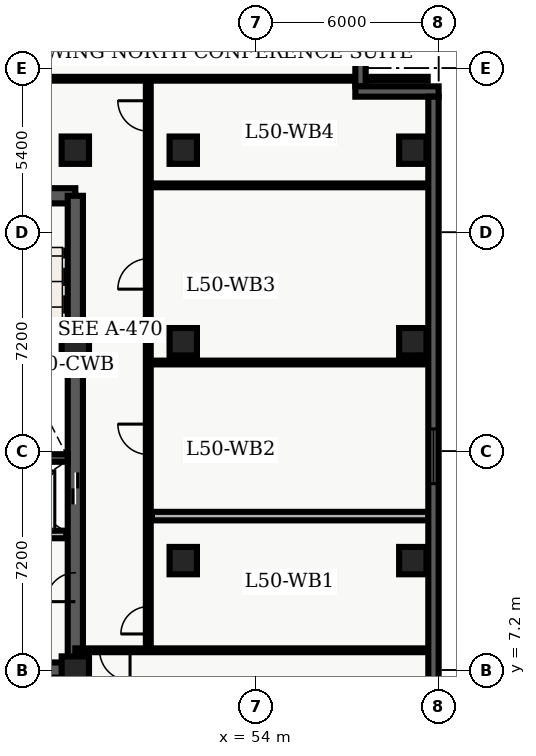
"""IFC4 building model, lengths in metres.
Left out: names, types, materials, properties, quantities, classifications, styles, units other than length and angle.
Written with IfcOpenShell. Run it as: python <this file> out.ifc"""

import sys

from ifc_helpers import new_model, entity, si_unit, converted_unit, direction, frame, origin_with_axes, origin_2d_with_axis, place, context, subcontext, project, spatial, polyline, rectangle, outline, extrude, element, fill, save


model = new_model("IFC4")
c1 = context("Model", 3, precision=1e-05, world=origin_with_axes(), true_north=direction((0.0, 1.0)))
c2 = subcontext(c1, "Body", "Model", "MODEL_VIEW")
j1 = project(units=[si_unit("LENGTHUNIT", "METRE"), converted_unit("PLANEANGLEUNIT", "DEGREE", entity("IfcPlaneAngleMeasure", 0.017), si_unit("PLANEANGLEUNIT", "RADIAN"), dimensions=[0, 0, 0, 0, 0, 0, 0])], contexts=[c1])
p1 = place(None, origin_with_axes())
s1 = spatial("IfcSite", under=j1, at=p1, CompositionType="ELEMENT")
p2 = place(p1, origin_with_axes())
s2 = spatial("IfcBuilding", under=s1, at=p2, CompositionType="ELEMENT")
p3 = place(p2, frame((0.0, 0.0, 204.3), z_axis=(0.0, 0.0, 1.0), x_axis=(1.0, 0.0, 0.0)))
s3 = spatial("IfcBuildingStorey", under=s2, at=p3, CompositionType="ELEMENT", Elevation=204.3)
p4 = place(p3, frame((40.2, 7.2, 0.0), z_axis=(0.0, 0.0, 1.0), x_axis=(1.0, 0.0, 0.0)))
e1 = element("IfcWall", 1, at=p4, inside=s3, PredefinedType="SHEAR", context=c2, shape_type="SweptSolid", body=[
    extrude(outline(polyline([(0.0, -0.25), (7.85, -0.25), (7.85, 0.25), (0.0, 0.25), (0.0, -0.25)])), origin_with_axes(), (0.0, 0.0, 1.0), 3.66),
])
p5 = place(p4, frame((2.175, 0.0, 0.0), z_axis=(0.0, 0.0, 1.0), x_axis=(1.0, 0.0, 0.0)))
e2 = element("IfcOpeningElement", 2, at=p5, cuts=e1, PredefinedType="OPENING", context=c2, shape_type="SweptSolid", body=[
    extrude(rectangle(XDim=1.05, YDim=0.52, at=origin_2d_with_axis()), origin_with_axes(), (0.0, 0.0, 1.0), 2.15),
])
p6 = place(p3, frame((40.2, 22.8, 0.0), z_axis=(0.0, 0.0, 1.0), x_axis=(1.0, 0.0, 0.0)))
e3 = element("IfcWall", 3, at=p6, inside=s3, PredefinedType="SHEAR", context=c2, shape_type="SweptSolid", body=[
    extrude(outline(polyline([(0.0, -0.25), (7.85, -0.25), (7.85, 0.25), (0.0, 0.25), (0.0, -0.25)])), origin_with_axes(), (0.0, 0.0, 1.0), 3.66),
])
p7 = place(p6, frame((5.775, 0.0, 0.0), z_axis=(0.0, 0.0, 1.0), x_axis=(1.0, 0.0, 0.0)))
e4 = element("IfcOpeningElement", 4, at=p7, cuts=e3, PredefinedType="OPENING", context=c2, shape_type="SweptSolid", body=[
    extrude(rectangle(XDim=1.05, YDim=0.52, at=origin_2d_with_axis()), origin_with_axes(), (0.0, 0.0, 1.0), 2.15),
])
p8 = place(p3, frame((48.05, 7.2, 0.0), z_axis=(0.0, 0.0, 1.0), x_axis=(0.0, 1.0, 0.0)))
e5 = element("IfcWall", 5, at=p8, inside=s3, PredefinedType="SHEAR", context=c2, shape_type="SweptSolid", body=[
    extrude(outline(polyline([(0.0, -0.25), (15.6, -0.25), (15.6, 0.25), (0.0, 0.25), (0.0, -0.25)])), origin_with_axes(), (0.0, 0.0, 1.0), 3.66),
])
p9 = place(p8, frame((5.975, 0.0, 0.0), z_axis=(0.0, 0.0, 1.0), x_axis=(1.0, 0.0, 0.0)))
e6 = element("IfcOpeningElement", 6, at=p9, cuts=e5, PredefinedType="OPENING", context=c2, shape_type="SweptSolid", body=[
    extrude(rectangle(XDim=1.05, YDim=0.52, at=origin_2d_with_axis()), origin_with_axes(), (0.0, 0.0, 1.0), 2.15),
])
p10 = place(p8, frame((2.725, 0.0, 0.0), z_axis=(0.0, 0.0, 1.0), x_axis=(1.0, 0.0, 0.0)))
e7 = element("IfcOpeningElement", 7, at=p10, cuts=e5, PredefinedType="OPENING", context=c2, shape_type="SweptSolid", body=[
    extrude(rectangle(XDim=0.95, YDim=0.52, at=origin_2d_with_axis()), origin_with_axes(), (0.0, 0.0, 1.0), 2.15),
])
p11 = place(p3, frame((44.25, 14.175, 0.0), z_axis=(0.0, 0.0, 1.0), x_axis=(1.0, 0.0, 0.0)))
e8 = element("IfcWall", 8, at=p11, inside=s3, PredefinedType="SHEAR", context=c2, shape_type="SweptSolid", body=[
    extrude(outline(polyline([(0.0, -0.125), (3.55, -0.125), (3.55, 0.125), (0.0, 0.125), (0.0, -0.125)])), origin_with_axes(), (0.0, 0.0, 1.0), 3.66),
])
for number, where, z_axis, x_axis in (
    (9, (48.05, 7.2, 0.0), (0.0, 0.0, 1.0), (1.0, 0.0, 0.0)),
    (10, (48.05, 18.0, 0.0), (0.0, 0.0, 1.0), (1.0, 0.0, 0.0)),
    (11, (48.05, 24.3, 0.0), (0.0, 0.0, 1.0), (1.0, 0.0, 0.0)),
    (12, (51.6, 10.8, 0.0), (0.0, 0.0, 1.0), (1.0, 0.0, 0.0)),
    (13, (51.6, 18.0, 0.0), (0.0, 0.0, 1.0), (1.0, 0.0, 0.0)),
    (14, (51.6, 24.3, 0.0), (0.0, 0.0, 1.0), (1.0, 0.0, 0.0)),
    (15, (59.15, 10.8, 0.0), (0.0, 0.0, 1.0), (1.0, 0.0, 0.0)),
    (16, (59.15, 18.0, 0.0), (0.0, 0.0, 1.0), (1.0, 0.0, 0.0)),
    (17, (59.15, 24.3, 0.0), (0.0, 0.0, 1.0), (1.0, 0.0, 0.0)),
):
    element("IfcColumn", number, at=place(p3, frame(where, z_axis=z_axis, x_axis=x_axis)), inside=s3, PredefinedType="COLUMN", context=c2, shape_type="SweptSolid", body=[
        extrude(rectangle(XDim=0.9, YDim=0.9, at=origin_2d_with_axis()), origin_with_axes(), (0.0, 0.0, 1.0), 3.9),
    ])
p12 = place(p3, frame((44.25, 11.66, 0.0), z_axis=(0.0, 0.0, 1.0), x_axis=(1.0, 0.0, 0.0)))
e18 = element("IfcWall", 18, at=p12, inside=s3, PredefinedType="SOLIDWALL", context=c2, shape_type="SweptSolid", body=[
    extrude(outline(polyline([(0.0, -0.125), (3.5, -0.125), (3.5, 0.125), (0.0, 0.125), (0.0, -0.125)])), origin_with_axes(), (0.0, 0.0, 1.0), 2.7),
])
p13 = place(p3, frame((50.45, 7.85, 0.0), z_axis=(0.0, 0.0, 1.0), x_axis=(0.0, 1.0, 0.0)))
e19 = element("IfcWall", 19, at=p13, inside=s3, PredefinedType="PARTITIONING", context=c2, shape_type="SweptSolid", body=[
    extrude(outline(polyline([(0.0, -0.08), (18.8, -0.08), (18.8, 0.08), (0.0, 0.08), (0.0, -0.08)])), origin_with_axes(), (0.0, 0.0, 1.0), 2.7),
])
p14 = place(p13, frame((0.987, 0.0, 0.0), z_axis=(0.0, 0.0, 1.0), x_axis=(1.0, 0.0, 0.0)))
e20 = element("IfcOpeningElement", 20, at=p14, cuts=e19, PredefinedType="OPENING", context=c2, shape_type="SweptSolid", body=[
    extrude(rectangle(XDim=0.9, YDim=0.18, at=origin_2d_with_axis()), origin_with_axes(), (0.0, 0.0, 1.0), 2.15),
])
p15 = place(p13, frame((6.94, 0.0, 0.0), z_axis=(0.0, 0.0, 1.0), x_axis=(1.0, 0.0, 0.0)))
e21 = element("IfcOpeningElement", 21, at=p15, cuts=e19, PredefinedType="OPENING", context=c2, shape_type="SweptSolid", body=[
    extrude(rectangle(XDim=1.0, YDim=0.18, at=origin_2d_with_axis()), origin_with_axes(), (0.0, 0.0, 1.0), 2.15),
])
p16 = place(p13, frame((12.38, 0.0, 0.0), z_axis=(0.0, 0.0, 1.0), x_axis=(1.0, 0.0, 0.0)))
e22 = element("IfcOpeningElement", 22, at=p16, cuts=e19, PredefinedType="OPENING", context=c2, shape_type="SweptSolid", body=[
    extrude(rectangle(XDim=1.0, YDim=0.18, at=origin_2d_with_axis()), origin_with_axes(), (0.0, 0.0, 1.0), 2.15),
])
p17 = place(p13, frame((17.576, 0.0, 0.0), z_axis=(0.0, 0.0, 1.0), x_axis=(1.0, 0.0, 0.0)))
e23 = element("IfcOpeningElement", 23, at=p17, cuts=e19, PredefinedType="OPENING", context=c2, shape_type="SweptSolid", body=[
    extrude(rectangle(XDim=1.0, YDim=0.18, at=origin_2d_with_axis()), origin_with_axes(), (0.0, 0.0, 1.0), 2.15),
])
p18 = place(p3, frame((59.665, 7.85, 0.0), z_axis=(0.0, 0.0, 1.0), x_axis=(-1.0, 0.0, 0.0)))
e24 = element("IfcWall", 24, at=p18, inside=s3, PredefinedType="PARTITIONING", context=c2, shape_type="SweptSolid", body=[
    extrude(outline(polyline([(0.0, -0.062), (11.615, -0.062), (11.615, 0.062), (0.0, 0.062), (0.0, -0.062)])), origin_with_axes(), (0.0, 0.0, 1.0), 2.7),
])
p19 = place(p18, frame((10.315, 0.0, 0.0), z_axis=(0.0, 0.0, 1.0), x_axis=(1.0, 0.0, 0.0)))
e25 = element("IfcOpeningElement", 25, at=p19, cuts=e24, PredefinedType="OPENING", context=c2, shape_type="SweptSolid", body=[
    extrude(rectangle(XDim=1.0, YDim=0.145, at=origin_2d_with_axis()), origin_with_axes(), (0.0, 0.0, 1.0), 2.15),
])
p20 = place(p3, frame((38.735, 26.65, 0.0), z_axis=(0.0, 0.0, 1.0), x_axis=(1.0, 0.0, 0.0)))
e26 = element("IfcWall", 26, at=p20, inside=s3, PredefinedType="PARTITIONING", context=c2, shape_type="SweptSolid", body=[
    extrude(outline(polyline([(0.0, -0.062), (20.905, -0.062), (20.905, 0.062), (0.0, 0.062), (0.0, -0.062)])), origin_with_axes(), (0.0, 0.0, 1.0), 2.7),
])
p21 = place(p20, frame((4.265, 0.0, 0.0), z_axis=(0.0, 0.0, 1.0), x_axis=(1.0, 0.0, 0.0)))
e27 = element("IfcOpeningElement", 27, at=p21, cuts=e26, PredefinedType="OPENING", context=c2, shape_type="SweptSolid", body=[
    extrude(rectangle(XDim=1.0, YDim=0.145, at=origin_2d_with_axis()), origin_with_axes(), (0.0, 0.0, 1.0), 2.15),
])
p22 = place(p3, frame((50.57, 12.264, 0.0), z_axis=(0.0, 0.0, 1.0), x_axis=(1.0, 0.0, 0.0)))
e28 = element("IfcWall", 28, at=p22, inside=s3, PredefinedType="PARTITIONING", context=c2, shape_type="SweptSolid", body=[
    extrude(outline(polyline([(0.0, -0.14), (9.095, -0.14), (9.095, 0.14), (0.0, 0.14), (0.0, -0.14)])), origin_with_axes(), (0.0, 0.0, 1.0), 2.7),
])
for number, where, z_axis, x_axis in (
    (29, (50.57, 17.316, 0.0), (0.0, 0.0, 1.0), (1.0, 0.0, 0.0)),
    (30, (50.57, 23.143, 0.0), (0.0, 0.0, 1.0), (1.0, 0.0, 0.0)),
):
    element("IfcWall", number, at=place(p3, frame(where, z_axis=z_axis, x_axis=x_axis)), inside=s3, PredefinedType="PARTITIONING", context=c2, shape_type="SweptSolid", body=[
        extrude(outline(polyline([(0.0, -0.062), (9.095, -0.062), (9.095, 0.062), (0.0, 0.062), (0.0, -0.062)])), origin_with_axes(), (0.0, 0.0, 1.0), 2.7),
    ])
p23 = place(p3, frame((57.43, 28.46, 0.0), z_axis=(0.0, 0.0, 1.0), x_axis=(0.0, -1.0, 0.0)))
e31 = element("IfcWall", 31, at=p23, inside=s3, PredefinedType="SOLIDWALL", context=c2, shape_type="SweptSolid", body=[
    extrude(outline(polyline([(0.0, -0.17), (2.06, -0.17), (2.06, 0.17), (0.0, 0.17), (0.0, -0.17)])), origin_with_axes(), (0.0, 0.0, 1.0), 3.66),
])
p24 = place(p3, frame((57.26, 26.23, 0.0), z_axis=(0.0, 0.0, 1.0), x_axis=(1.0, 0.0, 0.0)))
e32 = element("IfcWall", 32, at=p24, inside=s3, PredefinedType="SOLIDWALL", context=c2, shape_type="SweptSolid", body=[
    extrude(outline(polyline([(0.0, -0.17), (2.74, -0.17), (2.74, 0.17), (0.0, 0.17), (0.0, -0.17)])), origin_with_axes(), (0.0, 0.0, 1.0), 3.66),
])
p25 = place(p3, frame((59.83, 26.06, 0.0), z_axis=(0.0, 0.0, 1.0), x_axis=(0.0, -1.0, 0.0)))
e33 = element("IfcWall", 33, at=p25, inside=s3, PredefinedType="SOLIDWALL", context=c2, shape_type="SweptSolid", body=[
    extrude(outline(polyline([(0.0, -0.17), (23.66, -0.17), (23.66, 0.17), (0.0, 0.17), (0.0, -0.17)])), origin_with_axes(), (0.0, 0.0, 1.0), 3.66),
])
p26 = place(p25, frame((11.83, 0.0, 0.45), z_axis=(0.0, 0.0, 1.0), x_axis=(1.0, 0.0, 0.0)))
e34 = element("IfcOpeningElement", 34, at=p26, cuts=e33, PredefinedType="OPENING", context=c2, shape_type="SweptSolid", body=[
    extrude(rectangle(XDim=1.8, YDim=0.36, at=origin_2d_with_axis()), origin_with_axes(), (0.0, 0.0, 1.0), 2.1),
])
p27 = place(p25, frame((20.364, 0.0, 0.45), z_axis=(0.0, 0.0, 1.0), x_axis=(1.0, 0.0, 0.0)))
e35 = element("IfcOpeningElement", 35, at=p27, cuts=e33, PredefinedType="OPENING", context=c2, shape_type="SweptSolid", body=[
    extrude(rectangle(XDim=1.8, YDim=0.36, at=origin_2d_with_axis()), origin_with_axes(), (0.0, 0.0, 1.0), 2.1),
])
p28 = place(p8, frame((5.975, 0.0, 0.0), z_axis=(0.0, 0.0, 1.0), x_axis=(1.0, 0.0, 0.0)))
e36 = element("IfcDoor", 36, at=p28, inside=s3, OperationType="SLIDING_TO_LEFT", PredefinedType="DOOR", context=c2, shape_type="SweptSolid", body=[
    extrude(rectangle(XDim=1.05, YDim=0.09, at=origin_2d_with_axis()), origin_with_axes(), (0.0, 0.0, 1.0), 2.15),
])
fill(e6, e36)
p29 = place(p8, frame((2.725, 0.0, 0.0), z_axis=(0.0, 0.0, 1.0), x_axis=(1.0, 0.0, 0.0)))
e37 = element("IfcDoor", 37, at=p29, inside=s3, OperationType="SINGLE_SWING_LEFT", PredefinedType="DOOR", context=c2, shape_type="SweptSolid", body=[
    extrude(rectangle(XDim=0.95, YDim=0.09, at=origin_2d_with_axis()), origin_with_axes(), (0.0, 0.0, 1.0), 2.15),
])
fill(e7, e37)
p30 = place(p18, frame((10.315, 0.0, 0.0), z_axis=(0.0, 0.0, 1.0), x_axis=(1.0, 0.0, 0.0)))
e38 = element("IfcDoor", 38, at=p30, inside=s3, OperationType="SINGLE_SWING_LEFT", PredefinedType="DOOR", context=c2, shape_type="SweptSolid", body=[
    extrude(rectangle(XDim=1.0, YDim=0.075, at=origin_2d_with_axis()), origin_with_axes(), (0.0, 0.0, 1.0), 2.15),
])
fill(e25, e38)
p31 = place(p13, frame((0.987, 0.0, 0.0), z_axis=(0.0, 0.0, 1.0), x_axis=(1.0, 0.0, 0.0)))
e39 = element("IfcDoor", 39, at=p31, inside=s3, OperationType="SINGLE_SWING_LEFT", PredefinedType="DOOR", context=c2, shape_type="SweptSolid", body=[
    extrude(rectangle(XDim=0.9, YDim=0.09, at=origin_2d_with_axis()), origin_with_axes(), (0.0, 0.0, 1.0), 2.15),
])
fill(e20, e39)
p32 = place(p13, frame((6.94, 0.0, 0.0), z_axis=(0.0, 0.0, 1.0), x_axis=(1.0, 0.0, 0.0)))
e40 = element("IfcDoor", 40, at=p32, inside=s3, OperationType="SINGLE_SWING_RIGHT", PredefinedType="DOOR", context=c2, shape_type="SweptSolid", body=[
    extrude(rectangle(XDim=1.0, YDim=0.09, at=origin_2d_with_axis()), origin_with_axes(), (0.0, 0.0, 1.0), 2.15),
])
fill(e21, e40)
p33 = place(p13, frame((12.38, 0.0, 0.0), z_axis=(0.0, 0.0, 1.0), x_axis=(1.0, 0.0, 0.0)))
e41 = element("IfcDoor", 41, at=p33, inside=s3, OperationType="SINGLE_SWING_LEFT", PredefinedType="DOOR", context=c2, shape_type="SweptSolid", body=[
    extrude(rectangle(XDim=1.0, YDim=0.09, at=origin_2d_with_axis()), origin_with_axes(), (0.0, 0.0, 1.0), 2.15),
])
fill(e22, e41)
p34 = place(p13, frame((17.576, 0.0, 0.0), z_axis=(0.0, 0.0, 1.0), x_axis=(1.0, 0.0, 0.0)))
e42 = element("IfcDoor", 42, at=p34, inside=s3, OperationType="SINGLE_SWING_RIGHT", PredefinedType="DOOR", context=c2, shape_type="SweptSolid", body=[
    extrude(rectangle(XDim=1.0, YDim=0.09, at=origin_2d_with_axis()), origin_with_axes(), (0.0, 0.0, 1.0), 2.15),
])
fill(e23, e42)
p35 = place(p25, frame((11.83, 0.0, 0.45), z_axis=(0.0, 0.0, 1.0), x_axis=(1.0, 0.0, 0.0)))
e43 = element("IfcWindow", 43, at=p35, inside=s3, PredefinedType="WINDOW", context=c2, shape_type="SweptSolid", body=[
    extrude(rectangle(XDim=1.8, YDim=0.09, at=origin_2d_with_axis()), origin_with_axes(), (0.0, 0.0, 1.0), 2.1),
])
fill(e34, e43)
save(model, sys.argv[1])
